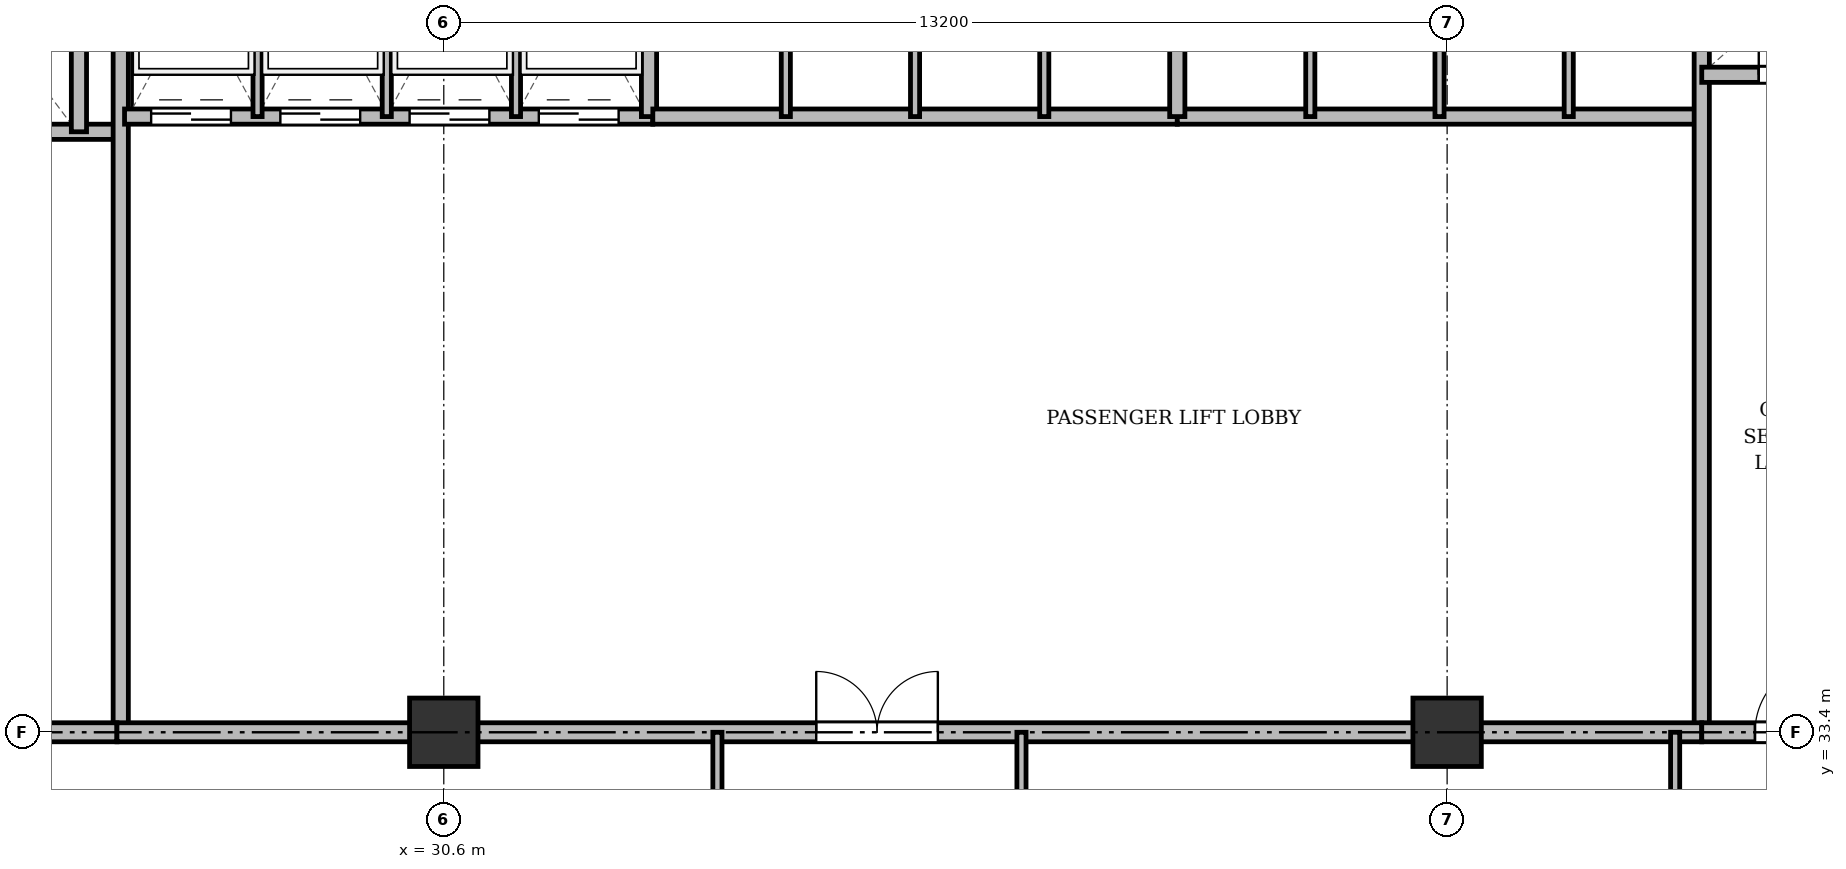
"""IFC4 building model, lengths in metres.
Left out: names, types, materials, properties, quantities, classifications, styles, units other than length and angle.
Written with IfcOpenShell. Run it as: python <this file> out.ifc"""

import sys

from ifc_helpers import new_model, si_unit, direction, frame, frame_2d, origin, origin_2d, place, context, subcontext, project, spatial, rectangle, extrude, source, transform, mapped, element, fill, save


model = new_model("IFC4")
c1 = context("Model", 3, precision=1e-05, world=origin(), true_north=direction((0.0, 1.0)))
c2 = subcontext(c1, "Body", "Model", "MODEL_VIEW")
j1 = project(units=[si_unit("LENGTHUNIT", "METRE"), si_unit("PLANEANGLEUNIT", "RADIAN")], contexts=[c1])
p1 = place(None, origin())
s1 = spatial("IfcSite", under=j1, at=p1, CompositionType="ELEMENT")
p2 = place(p1, origin())
s2 = spatial("IfcBuilding", under=s1, at=p2, CompositionType="ELEMENT")
p3 = place(p2, frame((0.0, 0.0, 37.9)))
s3 = spatial("IfcBuildingStorey", under=s2, at=p3, CompositionType="ELEMENT", Elevation=37.9)
m1 = source(origin(), c2, "Body", "SweptSolid", [
    extrude(rectangle(XDim=0.9, YDim=0.9, at=origin_2d()), origin(), (0.0, 0.0, 1.0), 3.6),
])
for number, where, z_axis, x_axis in (
    (1, (30.6, 33.4, 0.0), (0.0, 0.0, 1.0), (1.0, 0.0, 0.0)),
    (2, (43.8, 33.4, 0.0), (0.0, 0.0, 1.0), (1.0, 0.0, 0.0)),
):
    element("IfcColumn", number, at=place(p3, frame(where, z_axis=z_axis, x_axis=x_axis)), inside=s3, PredefinedType="COLUMN", context=c2, shape_type="MappedRepresentation", body=[
        mapped(m1, transform((0.0, 0.0, 0.0), x_axis=(1.0, 0.0, 0.0), y_axis=(0.0, 1.0, 0.0), z_axis=(0.0, 0.0, 1.0), scale=1.0)),
    ])
p4 = place(p3, frame((19.55, 41.3, 0.0), z_axis=(0.0, 0.0, 1.0), x_axis=(1.0, 0.0, 0.0)))
e3 = element("IfcWall", 3, at=p4, inside=s3, PredefinedType="SOLIDWALL", context=c2, shape_type="SweptSolid", body=[
    extrude(rectangle(XDim=6.75, YDim=0.2, at=frame_2d((3.375, 0.0))), origin(), (0.0, 0.0, 1.0), 3.34),
])
p5 = place(p4, frame((1.7, 0.0, 0.0)))
e4 = element("IfcOpeningElement", 4, at=p5, cuts=e3, PredefinedType="OPENING", context=c2, shape_type="SweptSolid", body=[
    extrude(rectangle(XDim=1.1, YDim=2.15, at=frame_2d((0.55, 1.075))), frame((0.0, 0.11, 0.0), z_axis=(0.0, -1.0, 0.0), x_axis=(1.0, 0.0, 0.0)), (0.0, 0.0, 1.0), 0.22),
])
p6 = place(p4, frame((4.4, 0.0, 0.0)))
e5 = element("IfcOpeningElement", 5, at=p6, cuts=e3, PredefinedType="OPENING", context=c2, shape_type="SweptSolid", body=[
    extrude(rectangle(XDim=1.1, YDim=2.15, at=frame_2d((0.55, 1.075))), frame((0.0, 0.11, 0.0), z_axis=(0.0, -1.0, 0.0), x_axis=(1.0, 0.0, 0.0)), (0.0, 0.0, 1.0), 0.22),
])
p7 = place(p3, frame((25.8, 41.3, 0.0), z_axis=(0.0, 0.0, 1.0), x_axis=(0.0, 1.0, 0.0)))
e6 = element("IfcWall", 6, at=p7, inside=s3, PredefinedType="SOLIDWALL", context=c2, shape_type="SweptSolid", body=[
    extrude(rectangle(XDim=3.4, YDim=0.2, at=frame_2d((1.7, 0.0))), origin(), (0.0, 0.0, 1.0), 3.34),
])
p8 = place(p3, frame((26.35, 33.4, 0.0), z_axis=(0.0, 0.0, 1.0), x_axis=(0.0, 1.0, 0.0)))
e7 = element("IfcWall", 7, at=p8, inside=s3, PredefinedType="SOLIDWALL", context=c2, shape_type="SweptSolid", body=[
    extrude(rectangle(XDim=11.3, YDim=0.2, at=frame_2d((5.65, 0.0))), origin(), (0.0, 0.0, 1.0), 2.69),
])
p9 = place(p3, frame((19.5, 33.4, 0.0), z_axis=(0.0, 0.0, 1.0), x_axis=(1.0, 0.0, 0.0)))
e8 = element("IfcWall", 8, at=p9, inside=s3, PredefinedType="PARTITIONING", context=c2, shape_type="SweptSolid", body=[
    extrude(rectangle(XDim=6.8, YDim=0.25, at=frame_2d((3.4, 0.0))), origin(), (0.0, 0.0, 1.0), 2.69),
])
p10 = place(p9, frame((0.75, 0.0, 0.0)))
e9 = element("IfcOpeningElement", 9, at=p10, cuts=e8, PredefinedType="OPENING", context=c2, shape_type="SweptSolid", body=[
    extrude(rectangle(XDim=1.6, YDim=2.2, at=frame_2d((0.8, 1.1))), frame((0.0, 0.135, 0.0), z_axis=(0.0, -1.0, 0.0), x_axis=(1.0, 0.0, 0.0)), (0.0, 0.0, 1.0), 0.27),
])
p11 = place(p3, frame((26.4, 41.5, 0.0), z_axis=(0.0, 0.0, 1.0), x_axis=(1.0, 0.0, 0.0)))
e10 = element("IfcWall", 10, at=p11, inside=s3, PredefinedType="SOLIDWALL", context=c2, shape_type="SweptSolid", body=[
    extrude(rectangle(XDim=6.95, YDim=0.2, at=frame_2d((3.475, 0.0))), origin(), (0.0, 0.0, 1.0), 3.34),
])
p12 = place(p11, frame((0.35, 0.0, 0.0)))
e11 = element("IfcOpeningElement", 11, at=p12, cuts=e10, PredefinedType="OPENING", context=c2, shape_type="SweptSolid", body=[
    extrude(rectangle(XDim=1.05, YDim=2.15, at=frame_2d((0.525, 1.075))), frame((0.0, 0.11, 0.0), z_axis=(0.0, -1.0, 0.0), x_axis=(1.0, 0.0, 0.0)), (0.0, 0.0, 1.0), 0.22),
])
p13 = place(p11, frame((2.05, 0.0, 0.0)))
e12 = element("IfcOpeningElement", 12, at=p13, cuts=e10, PredefinedType="OPENING", context=c2, shape_type="SweptSolid", body=[
    extrude(rectangle(XDim=1.05, YDim=2.15, at=frame_2d((0.525, 1.075))), frame((0.0, 0.11, 0.0), z_axis=(0.0, -1.0, 0.0), x_axis=(1.0, 0.0, 0.0)), (0.0, 0.0, 1.0), 0.22),
])
p14 = place(p11, frame((3.75, 0.0, 0.0)))
e13 = element("IfcOpeningElement", 13, at=p14, cuts=e10, PredefinedType="OPENING", context=c2, shape_type="SweptSolid", body=[
    extrude(rectangle(XDim=1.05, YDim=2.15, at=frame_2d((0.525, 1.075))), frame((0.0, 0.11, 0.0), z_axis=(0.0, -1.0, 0.0), x_axis=(1.0, 0.0, 0.0)), (0.0, 0.0, 1.0), 0.22),
])
p15 = place(p11, frame((5.45, 0.0, 0.0)))
e14 = element("IfcOpeningElement", 14, at=p15, cuts=e10, PredefinedType="OPENING", context=c2, shape_type="SweptSolid", body=[
    extrude(rectangle(XDim=1.05, YDim=2.15, at=frame_2d((0.525, 1.075))), frame((0.0, 0.11, 0.0), z_axis=(0.0, -1.0, 0.0), x_axis=(1.0, 0.0, 0.0)), (0.0, 0.0, 1.0), 0.22),
])
p16 = place(p3, frame((33.3, 41.5, 0.0), z_axis=(0.0, 0.0, 1.0), x_axis=(0.0, 1.0, 0.0)))
e15 = element("IfcWall", 15, at=p16, inside=s3, PredefinedType="SOLIDWALL", context=c2, shape_type="SweptSolid", body=[
    extrude(rectangle(XDim=3.2, YDim=0.2, at=frame_2d((1.6, 0.0))), origin(), (0.0, 0.0, 1.0), 3.34),
])
for number, where, z_axis, x_axis in (
    (16, (28.15, 41.5, 0.0), (0.0, 0.0, 1.0), (0.0, 1.0, 0.0)),
    (17, (29.85, 41.5, 0.0), (0.0, 0.0, 1.0), (0.0, 1.0, 0.0)),
    (18, (31.55, 41.5, 0.0), (0.0, 0.0, 1.0), (0.0, 1.0, 0.0)),
):
    element("IfcWall", number, at=place(p3, frame(where, z_axis=z_axis, x_axis=x_axis)), inside=s3, PredefinedType="PARTITIONING", context=c2, shape_type="SweptSolid", body=[
        extrude(rectangle(XDim=3.2, YDim=0.12, at=frame_2d((1.6, 0.0))), origin(), (0.0, 0.0, 1.0), 3.34),
    ])
p17 = place(p3, frame((33.35, 41.5, 0.0), z_axis=(0.0, 0.0, 1.0), x_axis=(1.0, 0.0, 0.0)))
e19 = element("IfcWall", 19, at=p17, inside=s3, PredefinedType="SOLIDWALL", context=c2, shape_type="SweptSolid", body=[
    extrude(rectangle(XDim=6.9, YDim=0.2, at=frame_2d((3.45, 0.0))), origin(), (0.0, 0.0, 1.0), 3.34),
])
for number, where, z_axis, x_axis in (
    (20, (35.1, 41.5, 0.0), (0.0, 0.0, 1.0), (0.0, 1.0, 0.0)),
    (21, (36.8, 41.5, 0.0), (0.0, 0.0, 1.0), (0.0, 1.0, 0.0)),
    (22, (38.5, 41.5, 0.0), (0.0, 0.0, 1.0), (0.0, 1.0, 0.0)),
):
    element("IfcWall", number, at=place(p3, frame(where, z_axis=z_axis, x_axis=x_axis)), inside=s3, PredefinedType="PARTITIONING", context=c2, shape_type="SweptSolid", body=[
        extrude(rectangle(XDim=3.2, YDim=0.12, at=frame_2d((1.6, 0.0))), origin(), (0.0, 0.0, 1.0), 3.34),
    ])
p18 = place(p3, frame((40.25, 41.5, 0.0), z_axis=(0.0, 0.0, 1.0), x_axis=(1.0, 0.0, 0.0)))
e23 = element("IfcWall", 23, at=p18, inside=s3, PredefinedType="SOLIDWALL", context=c2, shape_type="SweptSolid", body=[
    extrude(rectangle(XDim=6.9, YDim=0.2, at=frame_2d((3.45, 0.0))), origin(), (0.0, 0.0, 1.0), 2.752),
])
p19 = place(p3, frame((40.25, 41.5, 0.0), z_axis=(0.0, 0.0, 1.0), x_axis=(0.0, 1.0, 0.0)))
e24 = element("IfcWall", 24, at=p19, inside=s3, PredefinedType="SOLIDWALL", context=c2, shape_type="SweptSolid", body=[
    extrude(rectangle(XDim=3.2, YDim=0.2, at=frame_2d((1.6, 0.0))), origin(), (0.0, 0.0, 1.0), 3.34),
])
p20 = place(p3, frame((42.0, 41.5, 0.0), z_axis=(0.0, 0.0, 1.0), x_axis=(0.0, 1.0, 0.0)))
e25 = element("IfcWall", 25, at=p20, inside=s3, PredefinedType="PARTITIONING", context=c2, shape_type="SweptSolid", body=[
    extrude(rectangle(XDim=3.2, YDim=0.12, at=frame_2d((1.6, 0.0))), origin(), (0.0, 0.0, 1.0), 3.34),
])
p21 = place(p3, frame((43.7, 41.5, 0.0), z_axis=(0.0, 0.0, 1.0), x_axis=(0.0, 1.0, 0.0)))
e26 = element("IfcWall", 26, at=p21, inside=s3, PredefinedType="PARTITIONING", context=c2, shape_type="SweptSolid", body=[
    extrude(rectangle(XDim=3.2, YDim=0.12, at=frame_2d((1.6, 0.0))), origin(), (0.0, 0.0, 1.0), 2.752),
])
p22 = place(p3, frame((45.4, 41.5, 0.0), z_axis=(0.0, 0.0, 1.0), x_axis=(0.0, 1.0, 0.0)))
e27 = element("IfcWall", 27, at=p22, inside=s3, PredefinedType="PARTITIONING", context=c2, shape_type="SweptSolid", body=[
    extrude(rectangle(XDim=3.2, YDim=0.12, at=frame_2d((1.6, 0.0))), origin(), (0.0, 0.0, 1.0), 3.34),
])
p23 = place(p3, frame((47.15, 33.4, 0.0), z_axis=(0.0, 0.0, 1.0), x_axis=(0.0, 1.0, 0.0)))
e28 = element("IfcWall", 28, at=p23, inside=s3, PredefinedType="SOLIDWALL", context=c2, shape_type="SweptSolid", body=[
    extrude(rectangle(XDim=11.3, YDim=0.2, at=frame_2d((5.65, 0.0))), origin(), (0.0, 0.0, 1.0), 2.69),
])
p24 = place(p3, frame((26.3, 33.4, 0.0), z_axis=(0.0, 0.0, 1.0), x_axis=(1.0, 0.0, 0.0)))
e29 = element("IfcWall", 29, at=p24, inside=s3, PredefinedType="PARTITIONING", context=c2, shape_type="SweptSolid", body=[
    extrude(rectangle(XDim=20.85, YDim=0.25, at=frame_2d((10.425, 0.0))), origin(), (0.0, 0.0, 1.0), 2.69),
])
p25 = place(p24, frame((9.2, 0.0, 0.0)))
e30 = element("IfcOpeningElement", 30, at=p25, cuts=e29, PredefinedType="OPENING", context=c2, shape_type="SweptSolid", body=[
    extrude(rectangle(XDim=1.6, YDim=2.2, at=frame_2d((0.8, 1.1))), frame((0.0, 0.135, 0.0), z_axis=(0.0, -1.0, 0.0), x_axis=(1.0, 0.0, 0.0)), (0.0, 0.0, 1.0), 0.27),
])
p26 = place(p3, frame((47.15, 42.05, 0.0), z_axis=(0.0, 0.0, 1.0), x_axis=(1.0, 0.0, 0.0)))
e31 = element("IfcWall", 31, at=p26, inside=s3, PredefinedType="SOLIDWALL", context=c2, shape_type="SweptSolid", body=[
    extrude(rectangle(XDim=7.85, YDim=0.2, at=frame_2d((3.925, 0.0))), origin(), (0.0, 0.0, 1.0), 2.752),
])
p27 = place(p26, frame((0.75, 0.0, 0.0)))
e32 = element("IfcOpeningElement", 32, at=p27, cuts=e31, PredefinedType="OPENING", context=c2, shape_type="SweptSolid", body=[
    extrude(rectangle(XDim=0.9, YDim=2.1, at=frame_2d((0.45, 1.05))), frame((0.0, 0.11, 0.0), z_axis=(0.0, -1.0, 0.0), x_axis=(1.0, 0.0, 0.0)), (0.0, 0.0, 1.0), 0.22),
])
p28 = place(p26, frame((3.85, 0.0, 0.0)))
e33 = element("IfcOpeningElement", 33, at=p28, cuts=e31, PredefinedType="OPENING", context=c2, shape_type="SweptSolid", body=[
    extrude(rectangle(XDim=0.9, YDim=2.1, at=frame_2d((0.45, 1.05))), frame((0.0, 0.11, 0.0), z_axis=(0.0, -1.0, 0.0), x_axis=(1.0, 0.0, 0.0)), (0.0, 0.0, 1.0), 0.22),
])
p29 = place(p3, frame((47.15, 33.4, 0.0), z_axis=(0.0, 0.0, 1.0), x_axis=(1.0, 0.0, 0.0)))
e34 = element("IfcWall", 34, at=p29, inside=s3, PredefinedType="PARTITIONING", context=c2, shape_type="SweptSolid", body=[
    extrude(rectangle(XDim=11.15, YDim=0.25, at=frame_2d((5.575, 0.0))), origin(), (0.0, 0.0, 1.0), 2.69),
])
p30 = place(p29, frame((0.7, 0.0, 0.0)))
e35 = element("IfcOpeningElement", 35, at=p30, cuts=e34, PredefinedType="OPENING", context=c2, shape_type="SweptSolid", body=[
    extrude(rectangle(XDim=0.95, YDim=2.15, at=frame_2d((0.475, 1.075))), frame((0.0, 0.135, 0.0), z_axis=(0.0, -1.0, 0.0), x_axis=(1.0, 0.0, 0.0)), (0.0, 0.0, 1.0), 0.27),
])
p31 = place(p29, frame((6.0, 0.0, 0.0)))
e36 = element("IfcOpeningElement", 36, at=p31, cuts=e34, PredefinedType="OPENING", context=c2, shape_type="SweptSolid", body=[
    extrude(rectangle(XDim=1.2, YDim=2.15, at=frame_2d((0.6, 1.075))), frame((0.0, 0.135, 0.0), z_axis=(0.0, -1.0, 0.0), x_axis=(1.0, 0.0, 0.0)), (0.0, 0.0, 1.0), 0.27),
])
for number, where, z_axis, x_axis in (
    (37, (34.2, 29.8, 0.0), (0.0, 0.0, 1.0), (0.0, 1.0, 0.0)),
    (38, (38.2, 29.8, 0.0), (0.0, 0.0, 1.0), (0.0, 1.0, 0.0)),
    (39, (46.8, 29.8, 0.0), (0.0, 0.0, 1.0), (0.0, 1.0, 0.0)),
):
    element("IfcWall", number, at=place(p3, frame(where, z_axis=z_axis, x_axis=x_axis)), inside=s3, PredefinedType="PARTITIONING", context=c2, shape_type="SweptSolid", body=[
        extrude(rectangle(XDim=3.6, YDim=0.12, at=frame_2d((1.8, 0.0))), origin(), (0.0, 0.0, 1.0), 2.69),
    ])
m2 = source(origin(), c2, "Body", "SweptSolid", [
    extrude(rectangle(XDim=1.05, YDim=2.15, at=frame_2d((0.525, 1.075))), frame((0.0, 0.025, 0.0), z_axis=(0.0, -1.0, 0.0), x_axis=(1.0, 0.0, 0.0)), (0.0, 0.0, 1.0), 0.05),
])
p32 = place(p12, origin())
e40 = element("IfcDoor", 40, at=p32, inside=s3, OperationType="DOUBLE_DOOR_SLIDING", PredefinedType="DOOR", context=c2, shape_type="MappedRepresentation", body=[
    mapped(m2, transform((0.0, 0.0, 0.0), x_axis=(1.0, 0.0, 0.0), y_axis=(0.0, 1.0, 0.0), z_axis=(0.0, 0.0, 1.0), scale=1.0)),
])
fill(e11, e40)
p33 = place(p13, origin())
e41 = element("IfcDoor", 41, at=p33, inside=s3, OperationType="DOUBLE_DOOR_SLIDING", PredefinedType="DOOR", context=c2, shape_type="MappedRepresentation", body=[
    mapped(m2, transform((0.0, 0.0, 0.0), x_axis=(1.0, 0.0, 0.0), y_axis=(0.0, 1.0, 0.0), z_axis=(0.0, 0.0, 1.0), scale=1.0)),
])
fill(e12, e41)
p34 = place(p14, origin())
e42 = element("IfcDoor", 42, at=p34, inside=s3, OperationType="DOUBLE_DOOR_SLIDING", PredefinedType="DOOR", context=c2, shape_type="MappedRepresentation", body=[
    mapped(m2, transform((0.0, 0.0, 0.0), x_axis=(1.0, 0.0, 0.0), y_axis=(0.0, 1.0, 0.0), z_axis=(0.0, 0.0, 1.0), scale=1.0)),
])
fill(e13, e42)
p35 = place(p15, origin())
e43 = element("IfcDoor", 43, at=p35, inside=s3, OperationType="DOUBLE_DOOR_SLIDING", PredefinedType="DOOR", context=c2, shape_type="MappedRepresentation", body=[
    mapped(m2, transform((0.0, 0.0, 0.0), x_axis=(1.0, 0.0, 0.0), y_axis=(0.0, 1.0, 0.0), z_axis=(0.0, 0.0, 1.0), scale=1.0)),
])
fill(e14, e43)
m3 = source(origin(), c2, "Body", "SweptSolid", [
    extrude(rectangle(XDim=1.6, YDim=2.2, at=frame_2d((0.8, 1.1))), frame((0.0, 0.025, 0.0), z_axis=(0.0, -1.0, 0.0), x_axis=(1.0, 0.0, 0.0)), (0.0, 0.0, 1.0), 0.05),
])
p36 = place(p25, origin())
e44 = element("IfcDoor", 44, at=p36, inside=s3, OperationType="DOUBLE_DOOR_SINGLE_SWING", PredefinedType="DOOR", context=c2, shape_type="MappedRepresentation", body=[
    mapped(m3, transform((0.0, 0.0, 0.0), x_axis=(1.0, 0.0, 0.0), y_axis=(0.0, 1.0, 0.0), z_axis=(0.0, 0.0, 1.0), scale=1.0)),
])
fill(e30, e44)
m4 = source(origin(), c2, "Body", "SweptSolid", [
    extrude(rectangle(XDim=0.9, YDim=2.1, at=frame_2d((0.45, 1.05))), frame((0.0, 0.025, 0.0), z_axis=(0.0, -1.0, 0.0), x_axis=(1.0, 0.0, 0.0)), (0.0, 0.0, 1.0), 0.05),
])
p37 = place(p27, origin())
e45 = element("IfcDoor", 45, at=p37, inside=s3, OperationType="SINGLE_SWING_LEFT", PredefinedType="DOOR", context=c2, shape_type="MappedRepresentation", body=[
    mapped(m4, transform((0.0, 0.0, 0.0), x_axis=(1.0, 0.0, 0.0), y_axis=(0.0, 1.0, 0.0), z_axis=(0.0, 0.0, 1.0), scale=1.0)),
])
fill(e32, e45)
m5 = source(origin(), c2, "Body", "SweptSolid", [
    extrude(rectangle(XDim=0.95, YDim=2.15, at=frame_2d((0.475, 1.075))), frame((0.0, 0.025, 0.0), z_axis=(0.0, -1.0, 0.0), x_axis=(1.0, 0.0, 0.0)), (0.0, 0.0, 1.0), 0.05),
])
p38 = place(p30, origin())
e46 = element("IfcDoor", 46, at=p38, inside=s3, OperationType="SINGLE_SWING_RIGHT", PredefinedType="DOOR", context=c2, shape_type="MappedRepresentation", body=[
    mapped(m5, transform((0.0, 0.0, 0.0), x_axis=(1.0, 0.0, 0.0), y_axis=(0.0, 1.0, 0.0), z_axis=(0.0, 0.0, 1.0), scale=1.0)),
])
fill(e35, e46)
save(model, sys.argv[1])
